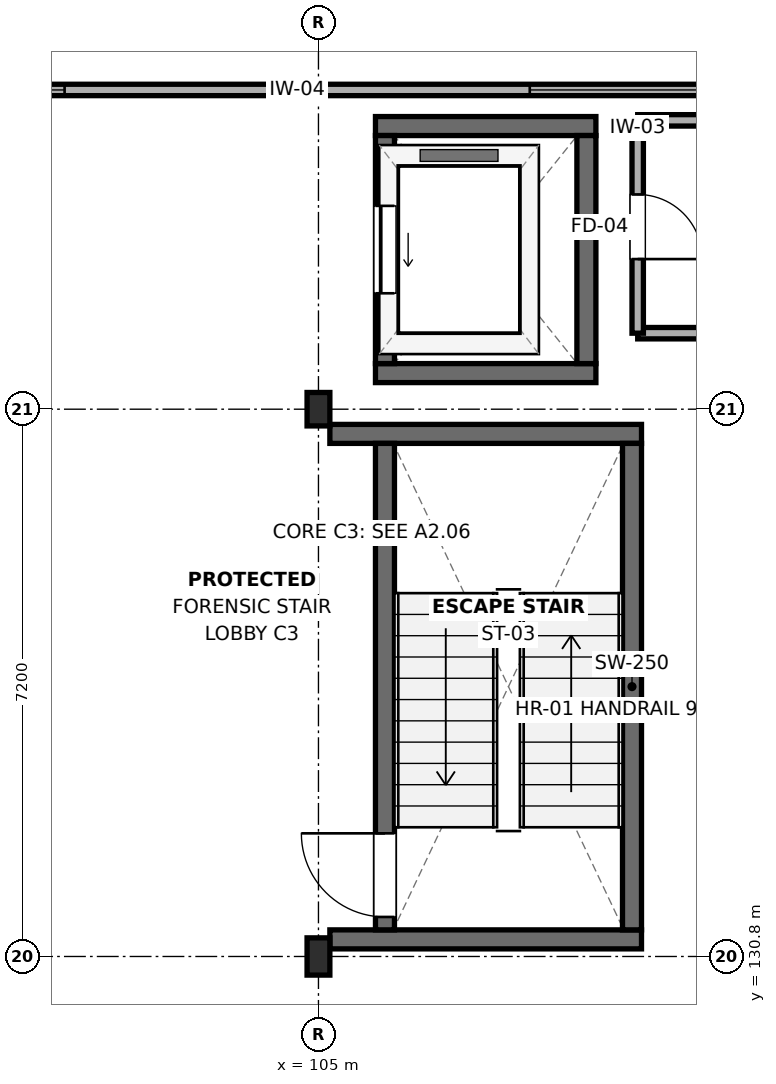
"""IFC4 building model, lengths in metres.
Left out: names, types, materials, properties, quantities, classifications, styles, units other than length and angle.
Written with IfcOpenShell. Run it as: python <this file> out.ifc"""

import sys

from ifc_helpers import new_model, si_unit, direction, frame, frame_2d, origin, origin_2d, place, context, subcontext, project, spatial, rectangle, i_section, extrude, element, fill, save


model = new_model("IFC4")
c1 = context("Model", 3, precision=1e-05, world=origin(), true_north=direction((0.0, 1.0)))
c2 = subcontext(c1, "Body", "Model", "MODEL_VIEW")
j1 = project(units=[si_unit("LENGTHUNIT", "METRE"), si_unit("PLANEANGLEUNIT", "RADIAN")], contexts=[c1])
p1 = place(None, origin())
s1 = spatial("IfcSite", under=j1, at=p1, CompositionType="ELEMENT")
p2 = place(p1, origin())
s2 = spatial("IfcBuilding", under=s1, at=p2, CompositionType="ELEMENT")
p3 = place(p2, frame((0.0, 0.0, 13.2)))
s3 = spatial("IfcBuildingStorey", under=s2, at=p3, CompositionType="ELEMENT", Elevation=13.2)
p4 = place(p3, frame((105.0, 130.8, 0.0), z_axis=(0.0, 0.0, 1.0), x_axis=(1.0, 0.0, 0.0)))
e1 = element("IfcColumn", 1, at=p4, inside=s3, PredefinedType="COLUMN", context=c2, shape_type="SweptSolid", body=[
    extrude(i_section(OverallWidth=0.3, OverallDepth=0.49, WebThickness=0.012, FlangeThickness=0.023, FilletRadius=0.027, at=origin_2d()), origin(), (0.0, 0.0, 1.0), 3.9),
])
p5 = place(p3, frame((105.0, 138.0, 0.0), z_axis=(0.0, 0.0, 1.0), x_axis=(1.0, 0.0, 0.0)))
e2 = element("IfcColumn", 2, at=p5, inside=s3, PredefinedType="COLUMN", context=c2, shape_type="SweptSolid", body=[
    extrude(i_section(OverallWidth=0.3, OverallDepth=0.44, WebThickness=0.011, FlangeThickness=0.021, FilletRadius=0.027, at=origin_2d()), origin(), (0.0, 0.0, 1.0), 3.9),
])
for number, where, z_axis, x_axis in (
    (3, (105.15, 131.025, 0.0), (0.0, 0.0, 1.0), (1.0, 0.0, 0.0)),
    (4, (105.15, 137.675, 0.0), (0.0, 0.0, 1.0), (1.0, 0.0, 0.0)),
):
    element("IfcWall", number, at=place(p3, frame(where, z_axis=z_axis, x_axis=x_axis)), inside=s3, PredefinedType="SHEAR", context=c2, shape_type="SweptSolid", body=[
        extrude(rectangle(XDim=4.1, YDim=0.25, at=frame_2d((2.05, 0.0))), origin(), (0.0, 0.0, 1.0), 3.7),
    ])
p6 = place(p3, frame((105.875, 131.15, 0.0), z_axis=(0.0, 0.0, 1.0), x_axis=(0.0, 1.0, 0.0)))
e5 = element("IfcWall", 5, at=p6, inside=s3, PredefinedType="SHEAR", context=c2, shape_type="SweptSolid", body=[
    extrude(rectangle(XDim=6.4, YDim=0.25, at=frame_2d((3.2, 0.0))), origin(), (0.0, 0.0, 1.0), 3.7),
])
p7 = place(p6, frame((0.17, 0.0, 0.0)))
e6 = element("IfcOpeningElement", 6, at=p7, cuts=e5, PredefinedType="OPENING", context=c2, shape_type="SweptSolid", body=[
    extrude(rectangle(XDim=1.1, YDim=2.15, at=frame_2d((0.55, 1.075))), frame((0.0, 0.14, 0.0), z_axis=(0.0, -1.0, 0.0), x_axis=(1.0, 0.0, 0.0)), (0.0, 0.0, 1.0), 0.28),
])
p8 = place(p3, frame((109.125, 131.15, 0.0), z_axis=(0.0, 0.0, 1.0), x_axis=(0.0, 1.0, 0.0)))
e7 = element("IfcWall", 7, at=p8, inside=s3, PredefinedType="SHEAR", context=c2, shape_type="SweptSolid", body=[
    extrude(rectangle(XDim=6.4, YDim=0.25, at=frame_2d((3.2, 0.0))), origin(), (0.0, 0.0, 1.0), 3.7),
])
for number, where, z_axis, x_axis in (
    (8, (105.75, 138.475, 0.0), (0.0, 0.0, 1.0), (1.0, 0.0, 0.0)),
    (9, (105.75, 141.725, 0.0), (0.0, 0.0, 1.0), (1.0, 0.0, 0.0)),
):
    element("IfcWall", number, at=place(p3, frame(where, z_axis=z_axis, x_axis=x_axis)), inside=s3, PredefinedType="SHEAR", context=c2, shape_type="SweptSolid", body=[
        extrude(rectangle(XDim=2.9, YDim=0.25, at=frame_2d((1.45, 0.0))), origin(), (0.0, 0.0, 1.0), 3.7),
    ])
p9 = place(p3, frame((105.875, 138.6, 0.0), z_axis=(0.0, 0.0, 1.0), x_axis=(0.0, 1.0, 0.0)))
e10 = element("IfcWall", 10, at=p9, inside=s3, PredefinedType="SHEAR", context=c2, shape_type="SweptSolid", body=[
    extrude(rectangle(XDim=3.0, YDim=0.25, at=frame_2d((1.5, 0.0))), origin(), (0.0, 0.0, 1.0), 3.7),
])
p10 = place(p9, frame((0.925, 0.0, 0.0)))
e11 = element("IfcOpeningElement", 11, at=p10, cuts=e10, PredefinedType="OPENING", context=c2, shape_type="SweptSolid", body=[
    extrude(rectangle(XDim=1.15, YDim=2.15, at=frame_2d((0.575, 1.075))), frame((0.0, 0.14, 0.0), z_axis=(0.0, -1.0, 0.0), x_axis=(1.0, 0.0, 0.0)), (0.0, 0.0, 1.0), 0.28),
])
p11 = place(p3, frame((108.525, 138.6, 0.0), z_axis=(0.0, 0.0, 1.0), x_axis=(0.0, 1.0, 0.0)))
e12 = element("IfcWall", 12, at=p11, inside=s3, PredefinedType="SHEAR", context=c2, shape_type="SweptSolid", body=[
    extrude(rectangle(XDim=3.0, YDim=0.25, at=frame_2d((1.5, 0.0))), origin(), (0.0, 0.0, 1.0), 3.7),
])
p12 = place(p3, frame((109.2, 139.0, 0.0), z_axis=(0.0, 0.0, 1.0), x_axis=(1.0, 0.0, 0.0)))
e13 = element("IfcWall", 13, at=p12, inside=s3, PredefinedType="PARTITIONING", context=c2, shape_type="SweptSolid", body=[
    extrude(rectangle(XDim=4.24, YDim=0.15, at=frame_2d((2.12, 0.0))), origin(), (0.0, 0.0, 1.0), 3.145),
])
p13 = place(p12, frame((1.52, 0.0, 0.95)))
e14 = element("IfcOpeningElement", 14, at=p13, cuts=e13, PredefinedType="OPENING", context=c2, shape_type="SweptSolid", body=[
    extrude(rectangle(XDim=1.2, YDim=1.5, at=frame_2d((0.6, 0.75))), frame((0.0, 0.09, 0.0), z_axis=(0.0, -1.0, 0.0), x_axis=(1.0, 0.0, 0.0)), (0.0, 0.0, 1.0), 0.18),
])
p14 = place(p3, frame((109.2, 141.8, 0.0), z_axis=(0.0, 0.0, 1.0), x_axis=(1.0, 0.0, 0.0)))
e15 = element("IfcWall", 15, at=p14, inside=s3, PredefinedType="PARTITIONING", context=c2, shape_type="SweptSolid", body=[
    extrude(rectangle(XDim=4.24, YDim=0.15, at=frame_2d((2.12, 0.0))), origin(), (0.0, 0.0, 1.0), 3.145),
])
p15 = place(p14, frame((1.52, 0.0, 0.95)))
e16 = element("IfcOpeningElement", 16, at=p15, cuts=e15, PredefinedType="OPENING", context=c2, shape_type="SweptSolid", body=[
    extrude(rectangle(XDim=1.2, YDim=1.5, at=frame_2d((0.6, 0.75))), frame((0.0, 0.09, 0.0), z_axis=(0.0, -1.0, 0.0), x_axis=(1.0, 0.0, 0.0)), (0.0, 0.0, 1.0), 0.18),
])
p16 = place(p3, frame((109.2, 139.0, 0.0), z_axis=(0.0, 0.0, 1.0), x_axis=(0.0, 1.0, 0.0)))
e17 = element("IfcWall", 17, at=p16, inside=s3, PredefinedType="PARTITIONING", context=c2, shape_type="SweptSolid", body=[
    extrude(rectangle(XDim=2.8, YDim=0.15, at=frame_2d((1.4, 0.0))), origin(), (0.0, 0.0, 1.0), 3.695),
])
p17 = place(p16, frame((0.975, 0.0, 0.0)))
e18 = element("IfcOpeningElement", 18, at=p17, cuts=e17, PredefinedType="OPENING", context=c2, shape_type="SweptSolid", body=[
    extrude(rectangle(XDim=0.85, YDim=2.1, at=frame_2d((0.425, 1.05))), frame((0.0, 0.09, 0.0), z_axis=(0.0, -1.0, 0.0), x_axis=(1.0, 0.0, 0.0)), (0.0, 0.0, 1.0), 0.18),
])
p18 = place(p3, frame((96.0, 142.2, 0.0), z_axis=(0.0, 0.0, 1.0), x_axis=(1.0, 0.0, 0.0)))
e19 = element("IfcWall", 19, at=p18, inside=s3, PredefinedType="PARTITIONING", context=c2, shape_type="SweptSolid", body=[
    extrude(rectangle(XDim=17.44, YDim=0.15, at=frame_2d((8.72, 0.0))), origin(), (0.0, 0.0, 1.0), 3.145),
])
p19 = place(p18, frame((3.06, 0.0, 0.95)))
e20 = element("IfcOpeningElement", 20, at=p19, cuts=e19, PredefinedType="OPENING", context=c2, shape_type="SweptSolid", body=[
    extrude(rectangle(XDim=2.6, YDim=1.5, at=frame_2d((1.3, 0.75))), frame((0.0, 0.09, 0.0), z_axis=(0.0, -1.0, 0.0), x_axis=(1.0, 0.0, 0.0)), (0.0, 0.0, 1.0), 0.18),
])
p20 = place(p18, frame((11.78, 0.0, 0.95)))
e21 = element("IfcOpeningElement", 21, at=p20, cuts=e19, PredefinedType="OPENING", context=c2, shape_type="SweptSolid", body=[
    extrude(rectangle(XDim=2.6, YDim=1.5, at=frame_2d((1.3, 0.75))), frame((0.0, 0.09, 0.0), z_axis=(0.0, -1.0, 0.0), x_axis=(1.0, 0.0, 0.0)), (0.0, 0.0, 1.0), 0.18),
])
p21 = place(p7, origin())
e22 = element("IfcDoor", 22, at=p21, inside=s3, OperationType="SINGLE_SWING_RIGHT", PredefinedType="DOOR", context=c2, shape_type="SweptSolid", body=[
    extrude(rectangle(XDim=1.1, YDim=2.15, at=frame_2d((0.55, 1.075))), frame((0.0, 0.025, 0.0), z_axis=(0.0, -1.0, 0.0), x_axis=(1.0, 0.0, 0.0)), (0.0, 0.0, 1.0), 0.05),
])
fill(e6, e22)
p22 = place(p10, origin())
e23 = element("IfcDoor", 23, at=p22, inside=s3, OperationType="SLIDING_TO_LEFT", PredefinedType="DOOR", context=c2, shape_type="SweptSolid", body=[
    extrude(rectangle(XDim=1.15, YDim=2.15, at=frame_2d((0.575, 1.075))), frame((0.0, 0.025, 0.0), z_axis=(0.0, -1.0, 0.0), x_axis=(1.0, 0.0, 0.0)), (0.0, 0.0, 1.0), 0.05),
])
fill(e11, e23)
p23 = place(p17, frame((0.85, 0.0, 0.0), z_axis=(0.0, 0.0, 1.0), x_axis=(-1.0, 0.0, 0.0)))
e24 = element("IfcDoor", 24, at=p23, inside=s3, OperationType="SINGLE_SWING_RIGHT", PredefinedType="DOOR", context=c2, shape_type="SweptSolid", body=[
    extrude(rectangle(XDim=0.85, YDim=2.1, at=frame_2d((0.425, 1.05))), frame((0.0, 0.025, 0.0), z_axis=(0.0, -1.0, 0.0), x_axis=(1.0, 0.0, 0.0)), (0.0, 0.0, 1.0), 0.05),
])
fill(e18, e24)
p24 = place(p19, origin())
e25 = element("IfcWindow", 25, at=p24, inside=s3, PartitioningType="SINGLE_PANEL", PredefinedType="WINDOW", context=c2, shape_type="SweptSolid", body=[
    extrude(rectangle(XDim=2.6, YDim=1.5, at=frame_2d((1.3, 0.75))), frame((0.0, 0.03, 0.0), z_axis=(0.0, -1.0, 0.0), x_axis=(1.0, 0.0, 0.0)), (0.0, 0.0, 1.0), 0.06),
])
fill(e20, e25)
p25 = place(p20, origin())
e26 = element("IfcWindow", 26, at=p25, inside=s3, PartitioningType="SINGLE_PANEL", PredefinedType="WINDOW", context=c2, shape_type="SweptSolid", body=[
    extrude(rectangle(XDim=2.6, YDim=1.5, at=frame_2d((1.3, 0.75))), frame((0.0, 0.03, 0.0), z_axis=(0.0, -1.0, 0.0), x_axis=(1.0, 0.0, 0.0)), (0.0, 0.0, 1.0), 0.06),
])
fill(e21, e26)
save(model, sys.argv[1])
